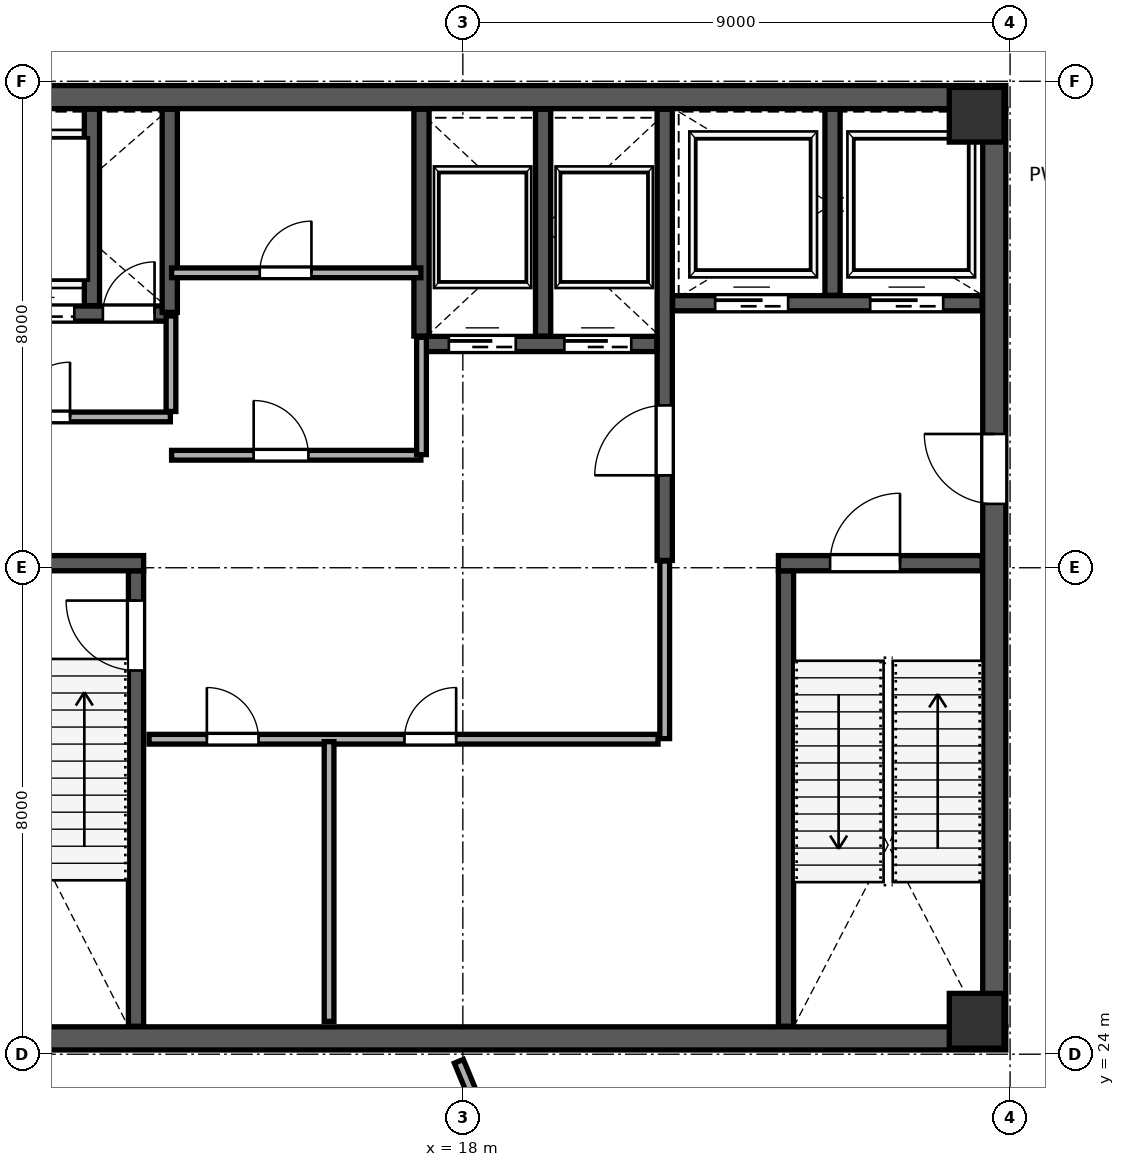
"""IFC4 building model, lengths in metres.
Left out: names, types, materials, properties, quantities, classifications, styles, units other than length and angle.
Written with IfcOpenShell. Run it as: python <this file> out.ifc"""

import sys

from ifc_helpers import new_model, si_unit, direction, frame, frame_2d, origin, origin_2d, place, context, subcontext, project, spatial, rectangle, extrude, source, transform, mapped, element, fill, save


model = new_model("IFC4")
c1 = context("Model", 3, precision=1e-05, world=origin(), true_north=direction((0.0, 1.0)))
c2 = subcontext(c1, "Body", "Model", "MODEL_VIEW")
j1 = project(units=[si_unit("LENGTHUNIT", "METRE"), si_unit("PLANEANGLEUNIT", "RADIAN")], contexts=[c1])
p1 = place(None, origin())
s1 = spatial("IfcSite", under=j1, at=p1, CompositionType="ELEMENT")
p2 = place(p1, origin())
s2 = spatial("IfcBuilding", under=s1, at=p2, CompositionType="ELEMENT")
p3 = place(p2, frame((0.0, 0.0, 355.2)))
s3 = spatial("IfcBuildingStorey", under=s2, at=p3, CompositionType="ELEMENT", Elevation=355.2)
m1 = source(origin(), c2, "Body", "SweptSolid", [
    extrude(rectangle(XDim=0.9, YDim=0.9, at=origin_2d()), origin(), (0.0, 0.0, 1.0), 4.799),
])
for number, where, z_axis, x_axis in (
    (1, (26.45, 24.55, 0.001), (0.0, 0.0, 1.0), (1.0, 0.0, 0.0)),
    (2, (26.45, 39.45, 0.001), (0.0, 0.0, 1.0), (1.0, 0.0, 0.0)),
):
    element("IfcColumn", number, at=place(p3, frame(where, z_axis=z_axis, x_axis=x_axis)), inside=s3, PredefinedType="COLUMN", context=c2, shape_type="MappedRepresentation", body=[
        mapped(m1, transform((0.0, 0.0, 0.0), scale=1.0)),
    ])
p4 = place(p3, frame((26.74, 24.45, 0.0), z_axis=(0.0, 0.0, 1.0), x_axis=(0.0, 1.0, 0.0)))
e3 = element("IfcWall", 3, at=p4, inside=s3, PredefinedType="SHEAR", context=c2, shape_type="SweptSolid", body=[
    extrude(rectangle(XDim=15.1, YDim=0.38, at=frame_2d((7.55, 0.0))), origin(), (0.0, 0.0, 1.0), 4.52),
])
p5 = place(p4, frame((8.6, 0.0, 0.0)))
e4 = element("IfcOpeningElement", 4, at=p5, cuts=e3, PredefinedType="OPENING", context=c2, shape_type="SweptSolid", body=[
    extrude(rectangle(XDim=1.15, YDim=2.2, at=frame_2d((0.575, 1.1))), frame((0.0, 0.2, 0.0), z_axis=(0.0, -1.0, 0.0), x_axis=(1.0, 0.0, 0.0)), (0.0, 0.0, 1.0), 0.4),
])
for number, where, z_axis, x_axis in (
    (5, (9.07, 24.26, 0.0), (0.0, 0.0, 1.0), (1.0, 0.0, 0.0)),
    (6, (9.07, 39.74, 0.0), (0.0, 0.0, 1.0), (1.0, 0.0, 0.0)),
):
    element("IfcWall", number, at=place(p3, frame(where, z_axis=z_axis, x_axis=x_axis)), inside=s3, PredefinedType="SHEAR", context=c2, shape_type="SweptSolid", body=[
        extrude(rectangle(XDim=17.86, YDim=0.38, at=frame_2d((8.93, 0.0))), origin(), (0.0, 0.0, 1.0), 4.52),
    ])
p6 = place(p3, frame((12.625, 24.46, 0.0), z_axis=(0.0, 0.0, 1.0), x_axis=(0.0, 1.0, 0.0)))
e7 = element("IfcWall", 7, at=p6, inside=s3, PredefinedType="SHEAR", context=c2, shape_type="SweptSolid", body=[
    extrude(rectangle(XDim=7.49, YDim=0.25, at=frame_2d((3.745, 0.0))), origin(), (0.0, 0.0, 1.0), 4.52),
])
p7 = place(p6, frame((5.85, 0.0, 0.0)))
e8 = element("IfcOpeningElement", 8, at=p7, cuts=e7, PredefinedType="OPENING", context=c2, shape_type="SweptSolid", body=[
    extrude(rectangle(XDim=1.15, YDim=2.2, at=frame_2d((0.575, 1.1))), frame((0.0, 0.135, 0.0), z_axis=(0.0, -1.0, 0.0), x_axis=(1.0, 0.0, 0.0)), (0.0, 0.0, 1.0), 0.27),
])
p8 = place(p3, frame((9.46, 32.075, 0.0), z_axis=(0.0, 0.0, 1.0), x_axis=(1.0, 0.0, 0.0)))
e9 = element("IfcWall", 9, at=p8, inside=s3, PredefinedType="SHEAR", context=c2, shape_type="SweptSolid", body=[
    extrude(rectangle(XDim=3.29, YDim=0.25, at=frame_2d((1.645, 0.0))), origin(), (0.0, 0.0, 1.0), 4.52),
])
p9 = place(p3, frame((23.315, 24.46, 0.0), z_axis=(0.0, 0.0, 1.0), x_axis=(0.0, 1.0, 0.0)))
e10 = element("IfcWall", 10, at=p9, inside=s3, PredefinedType="SHEAR", context=c2, shape_type="SweptSolid", body=[
    extrude(rectangle(XDim=7.49, YDim=0.25, at=frame_2d((3.745, 0.0))), origin(), (0.0, 0.0, 1.0), 4.52),
])
p10 = place(p3, frame((23.19, 32.075, 0.0), z_axis=(0.0, 0.0, 1.0), x_axis=(1.0, 0.0, 0.0)))
e11 = element("IfcWall", 11, at=p10, inside=s3, PredefinedType="SHEAR", context=c2, shape_type="SweptSolid", body=[
    extrude(rectangle(XDim=3.35, YDim=0.25, at=frame_2d((1.675, 0.0))), origin(), (0.0, 0.0, 1.0), 4.52),
])
p11 = place(p10, frame((0.85, 0.0, 0.0)))
e12 = element("IfcOpeningElement", 12, at=p11, cuts=e11, PredefinedType="OPENING", context=c2, shape_type="SweptSolid", body=[
    extrude(rectangle(XDim=1.15, YDim=2.2, at=frame_2d((0.575, 1.1))), frame((0.0, 0.135, 0.0), z_axis=(0.0, -1.0, 0.0), x_axis=(1.0, 0.0, 0.0)), (0.0, 0.0, 1.0), 0.27),
])
p12 = place(p3, frame((21.32, 32.12, 0.0), z_axis=(0.0, 0.0, 1.0), x_axis=(0.0, 1.0, 0.0)))
e13 = element("IfcWall", 13, at=p12, inside=s3, PredefinedType="SHEAR", context=c2, shape_type="SweptSolid", body=[
    extrude(rectangle(XDim=7.42, YDim=0.25, at=frame_2d((3.71, 0.0))), origin(), (0.0, 0.0, 1.0), 4.52),
])
p13 = place(p12, frame((1.4, 0.0, 0.0)))
e14 = element("IfcOpeningElement", 14, at=p13, cuts=e13, PredefinedType="OPENING", context=c2, shape_type="SweptSolid", body=[
    extrude(rectangle(XDim=1.15, YDim=2.2, at=frame_2d((0.575, 1.1))), frame((0.0, 0.135, 0.0), z_axis=(0.0, -1.0, 0.0), x_axis=(1.0, 0.0, 0.0)), (0.0, 0.0, 1.0), 0.27),
])
p14 = place(p3, frame((9.46, 36.18, 0.0), z_axis=(0.0, 0.0, 1.0), x_axis=(1.0, 0.0, 0.0)))
e15 = element("IfcWall", 15, at=p14, inside=s3, PredefinedType="SHEAR", context=c2, shape_type="SweptSolid", body=[
    extrude(rectangle(XDim=3.79, YDim=0.25, at=frame_2d((1.895, 0.0))), origin(), (0.0, 0.0, 1.0), 4.52),
])
p15 = place(p14, frame((2.62, 0.0, 0.0)))
e16 = element("IfcOpeningElement", 16, at=p15, cuts=e15, PredefinedType="OPENING", context=c2, shape_type="SweptSolid", body=[
    extrude(rectangle(XDim=0.85, YDim=2.1, at=frame_2d((0.425, 1.05))), frame((0.0, 0.135, 0.0), z_axis=(0.0, -1.0, 0.0), x_axis=(1.0, 0.0, 0.0)), (0.0, 0.0, 1.0), 0.27),
])
p16 = place(p14, frame((0.85, 0.0, 0.0)))
e17 = element("IfcOpeningElement", 17, at=p16, cuts=e15, PredefinedType="OPENING", context=c2, shape_type="SweptSolid", body=[
    extrude(rectangle(XDim=1.3, YDim=2.25, at=frame_2d((0.65, 1.125))), frame((0.0, 0.135, 0.0), z_axis=(0.0, -1.0, 0.0), x_axis=(1.0, 0.0, 0.0)), (0.0, 0.0, 1.0), 0.27),
])
p17 = place(p3, frame((11.9, 36.31, 0.0), z_axis=(0.0, 0.0, 1.0), x_axis=(0.0, 1.0, 0.0)))
e18 = element("IfcWall", 18, at=p17, inside=s3, PredefinedType="SHEAR", context=c2, shape_type="SweptSolid", body=[
    extrude(rectangle(XDim=3.23, YDim=0.25, at=frame_2d((1.615, 0.0))), origin(), (0.0, 0.0, 1.0), 4.52),
])
p18 = place(p3, frame((21.45, 36.35, 0.0), z_axis=(0.0, 0.0, 1.0), x_axis=(1.0, 0.0, 0.0)))
e19 = element("IfcWall", 19, at=p18, inside=s3, PredefinedType="SHEAR", context=c2, shape_type="SweptSolid", body=[
    extrude(rectangle(XDim=5.09, YDim=0.25, at=frame_2d((2.545, 0.0))), origin(), (0.0, 0.0, 1.0), 4.52),
])
p19 = place(p18, frame((0.7, 0.0, 0.0)))
e20 = element("IfcOpeningElement", 20, at=p19, cuts=e19, PredefinedType="OPENING", context=c2, shape_type="SweptSolid", body=[
    extrude(rectangle(XDim=1.2, YDim=2.2, at=frame_2d((0.6, 1.1))), frame((0.0, 0.135, 0.0), z_axis=(0.0, -1.0, 0.0), x_axis=(1.0, 0.0, 0.0)), (0.0, 0.0, 1.0), 0.27),
])
p20 = place(p18, frame((3.25, 0.0, 0.0)))
e21 = element("IfcOpeningElement", 21, at=p20, cuts=e19, PredefinedType="OPENING", context=c2, shape_type="SweptSolid", body=[
    extrude(rectangle(XDim=1.2, YDim=2.2, at=frame_2d((0.6, 1.1))), frame((0.0, 0.135, 0.0), z_axis=(0.0, -1.0, 0.0), x_axis=(1.0, 0.0, 0.0)), (0.0, 0.0, 1.0), 0.27),
])
p21 = place(p3, frame((24.08, 36.48, 0.0), z_axis=(0.0, 0.0, 1.0), x_axis=(0.0, 1.0, 0.0)))
e22 = element("IfcWall", 22, at=p21, inside=s3, PredefinedType="SHEAR", context=c2, shape_type="SweptSolid", body=[
    extrude(rectangle(XDim=3.06, YDim=0.25, at=frame_2d((1.53, 0.0))), origin(), (0.0, 0.0, 1.0), 4.52),
])
p22 = place(p3, frame((13.18, 36.2, 0.0), z_axis=(0.0, 0.0, 1.0), x_axis=(0.0, 1.0, 0.0)))
e23 = element("IfcWall", 23, at=p22, inside=s3, PredefinedType="SHEAR", context=c2, shape_type="SweptSolid", body=[
    extrude(rectangle(XDim=3.34, YDim=0.25, at=frame_2d((1.67, 0.0))), origin(), (0.0, 0.0, 1.0), 4.52),
])
p23 = place(p3, frame((17.32, 35.68, 0.0), z_axis=(0.0, 0.0, 1.0), x_axis=(1.0, 0.0, 0.0)))
e24 = element("IfcWall", 24, at=p23, inside=s3, PredefinedType="SHEAR", context=c2, shape_type="SweptSolid", body=[
    extrude(rectangle(XDim=3.87, YDim=0.25, at=frame_2d((1.935, 0.0))), origin(), (0.0, 0.0, 1.0), 4.52),
])
p24 = place(p23, frame((0.45, 0.0, 0.0)))
e25 = element("IfcOpeningElement", 25, at=p24, cuts=e24, PredefinedType="OPENING", context=c2, shape_type="SweptSolid", body=[
    extrude(rectangle(XDim=1.1, YDim=2.2, at=frame_2d((0.55, 1.1))), frame((0.0, 0.135, 0.0), z_axis=(0.0, -1.0, 0.0), x_axis=(1.0, 0.0, 0.0)), (0.0, 0.0, 1.0), 0.27),
])
p25 = place(p23, frame((2.35, 0.0, 0.0)))
e26 = element("IfcOpeningElement", 26, at=p25, cuts=e24, PredefinedType="OPENING", context=c2, shape_type="SweptSolid", body=[
    extrude(rectangle(XDim=1.1, YDim=2.2, at=frame_2d((0.55, 1.1))), frame((0.0, 0.135, 0.0), z_axis=(0.0, -1.0, 0.0), x_axis=(1.0, 0.0, 0.0)), (0.0, 0.0, 1.0), 0.27),
])
for number, where, z_axis, x_axis in (
    (27, (17.32, 35.81, 0.0), (0.0, 0.0, 1.0), (0.0, 1.0, 0.0)),
    (28, (19.32, 35.81, 0.0), (0.0, 0.0, 1.0), (0.0, 1.0, 0.0)),
):
    element("IfcWall", number, at=place(p3, frame(where, z_axis=z_axis, x_axis=x_axis)), inside=s3, PredefinedType="SHEAR", context=c2, shape_type="SweptSolid", body=[
        extrude(rectangle(XDim=3.73, YDim=0.25, at=frame_2d((1.865, 0.0))), origin(), (0.0, 0.0, 1.0), 4.52),
    ])
p26 = place(p3, frame((9.49, 34.48, 0.0), z_axis=(0.0, 0.0, 1.0), x_axis=(1.0, 0.0, 0.0)))
e29 = element("IfcWall", 29, at=p26, inside=s3, PredefinedType="PARTITIONING", context=c2, shape_type="SweptSolid", body=[
    extrude(rectangle(XDim=3.7, YDim=0.16, at=frame_2d((1.85, 0.0))), origin(), (0.0, 0.0, 1.0), 4.52),
])
p27 = place(p26, frame((1.15, 0.0, 0.0)))
e30 = element("IfcOpeningElement", 30, at=p27, cuts=e29, PredefinedType="OPENING", context=c2, shape_type="SweptSolid", body=[
    extrude(rectangle(XDim=0.9, YDim=2.15, at=frame_2d((0.45, 1.075))), frame((0.0, 0.09, 0.0), z_axis=(0.0, -1.0, 0.0), x_axis=(1.0, 0.0, 0.0)), (0.0, 0.0, 1.0), 0.18),
])
p28 = place(p3, frame((13.2, 34.57, 0.0), z_axis=(0.0, 0.0, 1.0), x_axis=(0.0, 1.0, 0.0)))
e31 = element("IfcWall", 31, at=p28, inside=s3, PredefinedType="PARTITIONING", context=c2, shape_type="SweptSolid", body=[
    extrude(rectangle(XDim=1.57, YDim=0.16, at=frame_2d((0.785, 0.0))), origin(), (0.0, 0.0, 1.0), 4.52),
])
p29 = place(p3, frame((13.21, 33.85, 0.0), z_axis=(0.0, 0.0, 1.0), x_axis=(1.0, 0.0, 0.0)))
e32 = element("IfcWall", 32, at=p29, inside=s3, PredefinedType="PARTITIONING", context=c2, shape_type="SweptSolid", body=[
    extrude(rectangle(XDim=4.1, YDim=0.16, at=frame_2d((2.05, 0.0))), origin(), (0.0, 0.0, 1.0), 4.52),
])
p30 = place(p29, frame((1.35, 0.0, 0.0)))
e33 = element("IfcOpeningElement", 33, at=p30, cuts=e32, PredefinedType="OPENING", context=c2, shape_type="SweptSolid", body=[
    extrude(rectangle(XDim=0.9, YDim=2.15, at=frame_2d((0.45, 1.075))), frame((0.0, 0.09, 0.0), z_axis=(0.0, -1.0, 0.0), x_axis=(1.0, 0.0, 0.0)), (0.0, 0.0, 1.0), 0.18),
])
p31 = place(p3, frame((17.32, 33.86, 0.0), z_axis=(0.0, 0.0, 1.0), x_axis=(0.0, 1.0, 0.0)))
e34 = element("IfcWall", 34, at=p31, inside=s3, PredefinedType="PARTITIONING", context=c2, shape_type="SweptSolid", body=[
    extrude(rectangle(XDim=1.93, YDim=0.16, at=frame_2d((0.965, 0.0))), origin(), (0.0, 0.0, 1.0), 4.52),
])
p32 = place(p3, frame((13.21, 36.85, 0.0), z_axis=(0.0, 0.0, 1.0), x_axis=(1.0, 0.0, 0.0)))
e35 = element("IfcWall", 35, at=p32, inside=s3, PredefinedType="PARTITIONING", context=c2, shape_type="SweptSolid", body=[
    extrude(rectangle(XDim=4.1, YDim=0.16, at=frame_2d((2.05, 0.0))), origin(), (0.0, 0.0, 1.0), 4.52),
])
p33 = place(p32, frame((1.45, 0.0, 0.0)))
e36 = element("IfcOpeningElement", 36, at=p33, cuts=e35, PredefinedType="OPENING", context=c2, shape_type="SweptSolid", body=[
    extrude(rectangle(XDim=0.85, YDim=2.1, at=frame_2d((0.425, 1.05))), frame((0.0, 0.09, 0.0), z_axis=(0.0, -1.0, 0.0), x_axis=(1.0, 0.0, 0.0)), (0.0, 0.0, 1.0), 0.18),
])
p34 = place(p3, frame((12.84, 29.18, 0.0), z_axis=(0.0, 0.0, 1.0), x_axis=(1.0, 0.0, 0.0)))
e37 = element("IfcWall", 37, at=p34, inside=s3, PredefinedType="PARTITIONING", context=c2, shape_type="SweptSolid", body=[
    extrude(rectangle(XDim=8.37, YDim=0.16, at=frame_2d((4.185, 0.0))), origin(), (0.0, 0.0, 1.0), 4.52),
])
p35 = place(p34, frame((0.95, 0.0, 0.0)))
e38 = element("IfcOpeningElement", 38, at=p35, cuts=e37, PredefinedType="OPENING", context=c2, shape_type="SweptSolid", body=[
    extrude(rectangle(XDim=0.85, YDim=2.1, at=frame_2d((0.425, 1.05))), frame((0.0, 0.09, 0.0), z_axis=(0.0, -1.0, 0.0), x_axis=(1.0, 0.0, 0.0)), (0.0, 0.0, 1.0), 0.18),
])
p36 = place(p34, frame((4.2, 0.0, 0.0)))
e39 = element("IfcOpeningElement", 39, at=p36, cuts=e37, PredefinedType="OPENING", context=c2, shape_type="SweptSolid", body=[
    extrude(rectangle(XDim=0.85, YDim=2.1, at=frame_2d((0.425, 1.05))), frame((0.0, 0.09, 0.0), z_axis=(0.0, -1.0, 0.0), x_axis=(1.0, 0.0, 0.0)), (0.0, 0.0, 1.0), 0.18),
])
p37 = place(p3, frame((15.8, 24.54, 0.0), z_axis=(0.0, 0.0, 1.0), x_axis=(0.0, 1.0, 0.0)))
e40 = element("IfcWall", 40, at=p37, inside=s3, PredefinedType="PARTITIONING", context=c2, shape_type="SweptSolid", body=[
    extrude(rectangle(XDim=4.6, YDim=0.16, at=frame_2d((2.3, 0.0))), origin(), (0.0, 0.0, 1.0), 4.52),
])
p38 = place(p3, frame((21.32, 29.19, 0.0), z_axis=(0.0, 0.0, 1.0), x_axis=(0.0, 1.0, 0.0)))
e41 = element("IfcWall", 41, at=p38, inside=s3, PredefinedType="PARTITIONING", context=c2, shape_type="SweptSolid", body=[
    extrude(rectangle(XDim=2.92, YDim=0.16, at=frame_2d((1.46, 0.0))), origin(), (0.0, 0.0, 1.0), 4.52),
])
p39 = place(p3, frame((17.935, 23.883, 0.0), z_axis=(0.0, 0.0, 1.0), x_axis=(0.382674767732, -0.923883121472, 0.0)))
e42 = element("IfcWall", 42, at=p39, inside=s3, PredefinedType="PARTITIONING", context=c2, shape_type="SweptSolid", body=[
    extrude(rectangle(XDim=4.495, YDim=0.16, at=frame_2d((2.248, 0.0))), origin(), (0.0, 0.0, 1.0), 4.52),
])
p40 = place(p3, frame((26.111, 47.992, 0.0), z_axis=(0.0, 0.0, 1.0), x_axis=(0.382686563741, -0.923878235447, 0.0)))
e43 = element("IfcWall", 43, at=p40, inside=s3, PredefinedType="PARTITIONING", context=c2, shape_type="SweptSolid", body=[
    extrude(rectangle(XDim=10.52, YDim=0.135, at=frame_2d((5.26, 0.0))), origin(), (0.0, 0.0, 1.0), 4.52),
])
p41 = place(p40, frame((2.8, 0.0, 0.0)))
e44 = element("IfcOpeningElement", 44, at=p41, cuts=e43, PredefinedType="OPENING", context=c2, shape_type="SweptSolid", body=[
    extrude(rectangle(XDim=0.95, YDim=2.15, at=frame_2d((0.475, 1.075))), frame((0.0, 0.078, 0.0), z_axis=(0.0, -1.0, 0.0), x_axis=(1.0, 0.0, 0.0)), (0.0, 0.0, 1.0), 0.155),
])
p42 = place(p3, frame((21.13, 20.298, 0.0), z_axis=(0.0, 0.0, 1.0), x_axis=(0.923880046805, 0.382682190748, 0.0)))
e45 = element("IfcWall", 45, at=p42, inside=s3, PredefinedType="PARTITIONING", context=c2, shape_type="SweptSolid", body=[
    extrude(rectangle(XDim=20.84, YDim=0.16, at=frame_2d((10.42, 0.0))), origin(), (0.0, 0.0, 1.0), 4.52),
])
m2 = source(origin(), c2, "Body", "SweptSolid", [
    extrude(rectangle(XDim=1.15, YDim=2.2, at=frame_2d((0.575, 1.1))), frame((0.0, 0.025, 0.0), z_axis=(0.0, -1.0, 0.0), x_axis=(1.0, 0.0, 0.0)), (0.0, 0.0, 1.0), 0.05),
])
p43 = place(p7, origin())
e46 = element("IfcDoor", 46, at=p43, inside=s3, OperationType="SINGLE_SWING_RIGHT", PredefinedType="DOOR", context=c2, shape_type="MappedRepresentation", body=[
    mapped(m2, transform((0.0, 0.0, 0.0), scale=1.0)),
])
fill(e8, e46)
m3 = source(origin(), c2, "Body", "SweptSolid", [
    extrude(rectangle(XDim=1.15, YDim=2.2, at=frame_2d((0.575, 1.1))), frame((0.0, 0.025, 0.0), z_axis=(0.0, -1.0, 0.0), x_axis=(1.0, 0.0, 0.0)), (0.0, 0.0, 1.0), 0.05),
])
p44 = place(p13, origin())
e47 = element("IfcDoor", 47, at=p44, inside=s3, OperationType="SINGLE_SWING_LEFT", PredefinedType="DOOR", context=c2, shape_type="MappedRepresentation", body=[
    mapped(m3, transform((0.0, 0.0, 0.0), scale=1.0)),
])
fill(e14, e47)
p45 = place(p11, origin())
e48 = element("IfcDoor", 48, at=p45, inside=s3, OperationType="SINGLE_SWING_RIGHT", PredefinedType="DOOR", context=c2, shape_type="MappedRepresentation", body=[
    mapped(m2, transform((0.0, 0.0, 0.0), scale=1.0)),
])
fill(e12, e48)
p46 = place(p5, origin())
e49 = element("IfcDoor", 49, at=p46, inside=s3, OperationType="SINGLE_SWING_RIGHT", PredefinedType="DOOR", context=c2, shape_type="MappedRepresentation", body=[
    mapped(m3, transform((0.0, 0.0, 0.0), scale=1.0)),
])
fill(e4, e49)
m4 = source(origin(), c2, "Body", "SweptSolid", [
    extrude(rectangle(XDim=0.85, YDim=2.1, at=frame_2d((0.425, 1.05))), frame((0.0, 0.025, 0.0), z_axis=(0.0, -1.0, 0.0), x_axis=(1.0, 0.0, 0.0)), (0.0, 0.0, 1.0), 0.05),
])
p47 = place(p15, origin())
e50 = element("IfcDoor", 50, at=p47, inside=s3, OperationType="SINGLE_SWING_RIGHT", PredefinedType="DOOR", context=c2, shape_type="MappedRepresentation", body=[
    mapped(m4, transform((0.0, 0.0, 0.0), scale=1.0)),
])
fill(e16, e50)
m5 = source(origin(), c2, "Body", "SweptSolid", [
    extrude(rectangle(XDim=1.1, YDim=2.2, at=frame_2d((0.55, 1.1))), frame((0.0, 0.025, 0.0), z_axis=(0.0, -1.0, 0.0), x_axis=(1.0, 0.0, 0.0)), (0.0, 0.0, 1.0), 0.05),
])
p48 = place(p24, origin())
e51 = element("IfcDoor", 51, at=p48, inside=s3, OperationType="SLIDING_TO_LEFT", PredefinedType="DOOR", context=c2, shape_type="MappedRepresentation", body=[
    mapped(m5, transform((0.0, 0.0, 0.0), scale=1.0)),
])
fill(e25, e51)
p49 = place(p25, origin())
e52 = element("IfcDoor", 52, at=p49, inside=s3, OperationType="SLIDING_TO_RIGHT", PredefinedType="DOOR", context=c2, shape_type="MappedRepresentation", body=[
    mapped(m5, transform((0.0, 0.0, 0.0), scale=1.0)),
])
fill(e26, e52)
m6 = source(origin(), c2, "Body", "SweptSolid", [
    extrude(rectangle(XDim=1.2, YDim=2.2, at=frame_2d((0.6, 1.1))), frame((0.0, 0.025, 0.0), z_axis=(0.0, -1.0, 0.0), x_axis=(1.0, 0.0, 0.0)), (0.0, 0.0, 1.0), 0.05),
])
p50 = place(p19, origin())
e53 = element("IfcDoor", 53, at=p50, inside=s3, OperationType="SLIDING_TO_LEFT", PredefinedType="DOOR", context=c2, shape_type="MappedRepresentation", body=[
    mapped(m6, transform((0.0, 0.0, 0.0), scale=1.0)),
])
fill(e20, e53)
p51 = place(p20, origin())
e54 = element("IfcDoor", 54, at=p51, inside=s3, OperationType="SLIDING_TO_RIGHT", PredefinedType="DOOR", context=c2, shape_type="MappedRepresentation", body=[
    mapped(m6, transform((0.0, 0.0, 0.0), scale=1.0)),
])
fill(e21, e54)
m7 = source(origin(), c2, "Body", "SweptSolid", [
    extrude(rectangle(XDim=1.3, YDim=2.25, at=frame_2d((0.65, 1.125))), frame((0.0, 0.025, 0.0), z_axis=(0.0, -1.0, 0.0), x_axis=(1.0, 0.0, 0.0)), (0.0, 0.0, 1.0), 0.05),
])
p52 = place(p16, origin())
e55 = element("IfcDoor", 55, at=p52, inside=s3, OperationType="SLIDING_TO_LEFT", PredefinedType="DOOR", context=c2, shape_type="MappedRepresentation", body=[
    mapped(m7, transform((0.0, 0.0, 0.0), scale=1.0)),
])
fill(e17, e55)
m8 = source(origin(), c2, "Body", "SweptSolid", [
    extrude(rectangle(XDim=0.9, YDim=2.15, at=frame_2d((0.45, 1.075))), frame((0.0, 0.025, 0.0), z_axis=(0.0, -1.0, 0.0), x_axis=(1.0, 0.0, 0.0)), (0.0, 0.0, 1.0), 0.05),
])
p53 = place(p27, origin())
e56 = element("IfcDoor", 56, at=p53, inside=s3, OperationType="SINGLE_SWING_RIGHT", PredefinedType="DOOR", context=c2, shape_type="MappedRepresentation", body=[
    mapped(m8, transform((0.0, 0.0, 0.0), scale=1.0)),
])
fill(e30, e56)
p54 = place(p30, origin())
e57 = element("IfcDoor", 57, at=p54, inside=s3, OperationType="SINGLE_SWING_LEFT", PredefinedType="DOOR", context=c2, shape_type="MappedRepresentation", body=[
    mapped(m8, transform((0.0, 0.0, 0.0), scale=1.0)),
])
fill(e33, e57)
p55 = place(p33, origin())
e58 = element("IfcDoor", 58, at=p55, inside=s3, OperationType="SINGLE_SWING_RIGHT", PredefinedType="DOOR", context=c2, shape_type="MappedRepresentation", body=[
    mapped(m4, transform((0.0, 0.0, 0.0), scale=1.0)),
])
fill(e36, e58)
p56 = place(p35, origin())
e59 = element("IfcDoor", 59, at=p56, inside=s3, OperationType="SINGLE_SWING_LEFT", PredefinedType="DOOR", context=c2, shape_type="MappedRepresentation", body=[
    mapped(m4, transform((0.0, 0.0, 0.0), scale=1.0)),
])
fill(e38, e59)
p57 = place(p36, origin())
e60 = element("IfcDoor", 60, at=p57, inside=s3, OperationType="SINGLE_SWING_RIGHT", PredefinedType="DOOR", context=c2, shape_type="MappedRepresentation", body=[
    mapped(m4, transform((0.0, 0.0, 0.0), scale=1.0)),
])
fill(e39, e60)
save(model, sys.argv[1])
